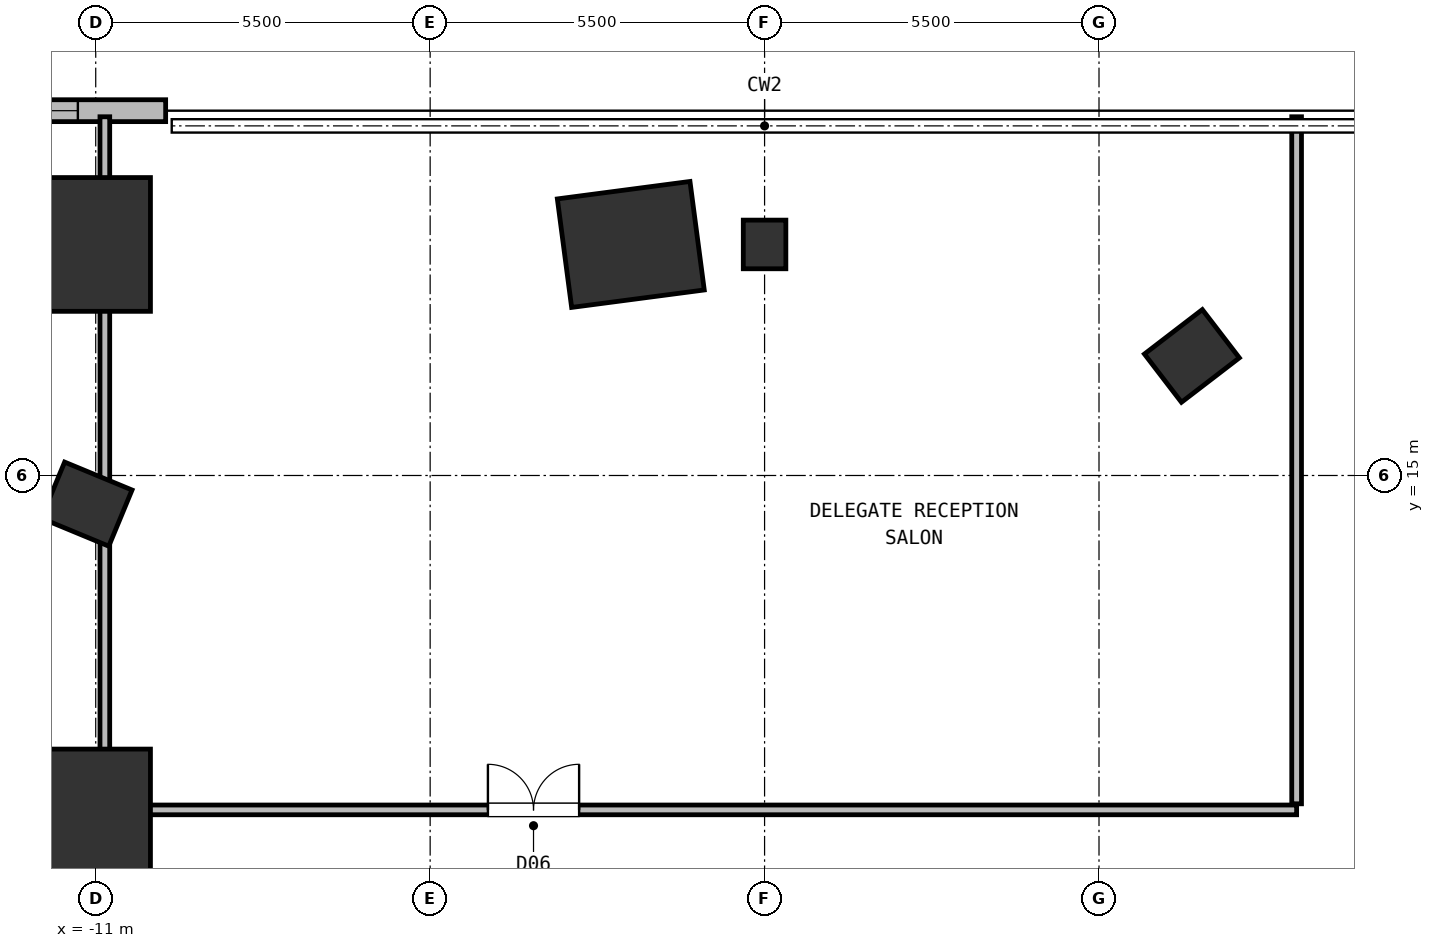
"""IFC4 building model, lengths in metres.
Left out: names, types, materials, properties, quantities, classifications, styles, units other than length and angle.
Written with IfcOpenShell. Run it as: python <this file> out.ifc"""

import sys

from ifc_helpers import new_model, si_unit, direction, frame, frame_2d, origin, origin_2d, place, context, subcontext, project, spatial, rectangle, extrude, element, fill, save


model = new_model("IFC4")
c1 = context("Model", 3, precision=1e-05, world=origin(), true_north=direction((0.0, 1.0)))
c2 = subcontext(c1, "Body", "Model", "MODEL_VIEW")
j1 = project(units=[si_unit("LENGTHUNIT", "METRE"), si_unit("PLANEANGLEUNIT", "RADIAN")], contexts=[c1])
p1 = place(None, origin())
s1 = spatial("IfcSite", under=j1, at=p1, CompositionType="ELEMENT")
p2 = place(p1, origin())
s2 = spatial("IfcBuilding", under=s1, at=p2, CompositionType="ELEMENT")
p3 = place(p2, frame((0.0, 0.0, 21.5)))
s3 = spatial("IfcBuildingStorey", under=s2, at=p3, CompositionType="ELEMENT", Elevation=21.5)
p4 = place(p3, frame((-2.2, 18.8, 0.0), z_axis=(0.0, 0.0, 1.0), x_axis=(-0.13052619222, 0.991444861374, 0.0)))
e1 = element("IfcColumn", 1, at=p4, inside=s3, PredefinedType="COLUMN", context=c2, shape_type="SweptSolid", body=[
    extrude(rectangle(XDim=1.8, YDim=2.2, at=origin_2d()), origin(), (0.0, 0.0, 1.0), 4.5),
])
for number, where, z_axis, x_axis in (
    (2, (-11.148, 14.529, 0.0), (0.0, 0.0, 1.0), (0.383, 0.924, 0.0)),
    (3, (7.028, 16.966, 0.0), (0.0, 0.0, 1.0), (-0.609, 0.793, 0.0)),
):
    element("IfcColumn", number, at=place(p3, frame(where, z_axis=z_axis, x_axis=x_axis)), inside=s3, PredefinedType="COLUMN", context=c2, shape_type="SweptSolid", body=[
        extrude(rectangle(XDim=1.0, YDim=1.2, at=origin_2d()), origin(), (0.0, 0.0, 1.0), 4.5),
    ])
for number, where, z_axis, x_axis in (
    (4, (-11.0, 9.4, 0.0), (0.0, 0.0, 1.0), (1.0, 0.0, 0.0)),
    (5, (-11.0, 18.8, 0.0), (0.0, 0.0, 1.0), (1.0, 0.0, 0.0)),
):
    element("IfcColumn", number, at=place(p3, frame(where, z_axis=z_axis, x_axis=x_axis)), inside=s3, PredefinedType="COLUMN", context=c2, shape_type="SweptSolid", body=[
        extrude(rectangle(XDim=1.8, YDim=2.2, at=origin_2d()), origin(), (0.0, 0.0, 1.0), 4.5),
    ])
p5 = place(p3, frame((0.0, 18.8, 0.0), z_axis=(0.0, 0.0, 1.0), x_axis=(1.0, 0.0, 0.0)))
e6 = element("IfcColumn", 6, at=p5, inside=s3, PredefinedType="COLUMN", context=c2, shape_type="SweptSolid", body=[
    extrude(rectangle(XDim=0.7, YDim=0.8, at=origin_2d()), origin(), (0.0, 0.0, 1.0), 4.5),
])
p6 = place(p3, frame((-31.0, 21.0, 0.0), z_axis=(0.0, 0.0, 1.0), x_axis=(1.0, 0.0, 0.0)))
e7 = element("IfcWall", 7, at=p6, inside=s3, PredefinedType="SOLIDWALL", context=c2, shape_type="SweptSolid", body=[
    extrude(rectangle(XDim=21.15, YDim=0.36, at=frame_2d((10.575, 0.0))), origin(), (0.0, 0.0, 1.0), 4.22),
])
p7 = place(p6, frame((1.444, 0.0, 0.95)))
e8 = element("IfcOpeningElement", 8, at=p7, cuts=e7, PredefinedType="OPENING", context=c2, shape_type="SweptSolid", body=[
    extrude(rectangle(XDim=2.4, YDim=2.6, at=frame_2d((1.2, 1.3))), frame((0.0, 0.19, 0.0), z_axis=(0.0, -1.0, 0.0), x_axis=(1.0, 0.0, 0.0)), (0.0, 0.0, 1.0), 0.38),
])
p8 = place(p6, frame((6.731, 0.0, 0.95)))
e9 = element("IfcOpeningElement", 9, at=p8, cuts=e7, PredefinedType="OPENING", context=c2, shape_type="SweptSolid", body=[
    extrude(rectangle(XDim=2.4, YDim=2.6, at=frame_2d((1.2, 1.3))), frame((0.0, 0.19, 0.0), z_axis=(0.0, -1.0, 0.0), x_axis=(1.0, 0.0, 0.0)), (0.0, 0.0, 1.0), 0.38),
])
p9 = place(p6, frame((12.019, 0.0, 0.95)))
e10 = element("IfcOpeningElement", 10, at=p9, cuts=e7, PredefinedType="OPENING", context=c2, shape_type="SweptSolid", body=[
    extrude(rectangle(XDim=2.4, YDim=2.6, at=frame_2d((1.2, 1.3))), frame((0.0, 0.19, 0.0), z_axis=(0.0, -1.0, 0.0), x_axis=(1.0, 0.0, 0.0)), (0.0, 0.0, 1.0), 0.38),
])
p10 = place(p6, frame((17.306, 0.0, 0.95)))
e11 = element("IfcOpeningElement", 11, at=p10, cuts=e7, PredefinedType="OPENING", context=c2, shape_type="SweptSolid", body=[
    extrude(rectangle(XDim=2.4, YDim=2.6, at=frame_2d((1.2, 1.3))), frame((0.0, 0.19, 0.0), z_axis=(0.0, -1.0, 0.0), x_axis=(1.0, 0.0, 0.0)), (0.0, 0.0, 1.0), 0.38),
])
p11 = place(p3, frame((-10.85, 2.0, 0.0), z_axis=(0.0, 0.0, 1.0), x_axis=(0.0, 1.0, 0.0)))
e12 = element("IfcWall", 12, at=p11, inside=s3, PredefinedType="PARTITIONING", context=c2, shape_type="SweptSolid", body=[
    extrude(rectangle(XDim=18.9, YDim=0.16, at=frame_2d((9.45, 0.0))), origin(), (0.0, 0.0, 1.0), 3.6),
])
p12 = place(p11, frame((4.06, 0.0, 0.0)))
e13 = element("IfcOpeningElement", 13, at=p12, cuts=e12, PredefinedType="OPENING", context=c2, shape_type="SweptSolid", body=[
    extrude(rectangle(XDim=1.5, YDim=2.2, at=frame_2d((0.75, 1.1))), frame((0.0, 0.09, 0.0), z_axis=(0.0, -1.0, 0.0), x_axis=(1.0, 0.0, 0.0)), (0.0, 0.0, 1.0), 0.18),
])
p13 = place(p3, frame((-10.75, 9.5, 0.0), z_axis=(0.0, 0.0, 1.0), x_axis=(1.0, 0.0, 0.0)))
e14 = element("IfcWall", 14, at=p13, inside=s3, PredefinedType="PARTITIONING", context=c2, shape_type="SweptSolid", body=[
    extrude(rectangle(XDim=19.5, YDim=0.16, at=frame_2d((9.75, 0.0))), origin(), (0.0, 0.0, 1.0), 3.3),
])
p14 = place(p13, frame((6.2, 0.0, 0.0)))
e15 = element("IfcOpeningElement", 15, at=p14, cuts=e14, PredefinedType="OPENING", context=c2, shape_type="SweptSolid", body=[
    extrude(rectangle(XDim=1.5, YDim=2.2, at=frame_2d((0.75, 1.1))), frame((0.0, 0.09, 0.0), z_axis=(0.0, -1.0, 0.0), x_axis=(1.0, 0.0, 0.0)), (0.0, 0.0, 1.0), 0.18),
])
p15 = place(p3, frame((8.75, 9.6, 0.0), z_axis=(0.0, 0.0, 1.0), x_axis=(0.0, 1.0, 0.0)))
e16 = element("IfcWall", 16, at=p15, inside=s3, PredefinedType="PARTITIONING", context=c2, shape_type="SweptSolid", body=[
    extrude(rectangle(XDim=11.3, YDim=0.16, at=frame_2d((5.65, 0.0))), origin(), (0.0, 0.0, 1.0), 4.22),
])
p16 = place(p10, origin())
e17 = element("IfcWindow", 17, at=p16, inside=s3, PartitioningType="SINGLE_PANEL", PredefinedType="WINDOW", context=c2, shape_type="SweptSolid", body=[
    extrude(rectangle(XDim=2.4, YDim=2.6, at=frame_2d((1.2, 1.3))), frame((0.0, 0.03, 0.0), z_axis=(0.0, -1.0, 0.0), x_axis=(1.0, 0.0, 0.0)), (0.0, 0.0, 1.0), 0.06),
])
fill(e11, e17)
p17 = place(p14, origin())
e18 = element("IfcDoor", 18, at=p17, inside=s3, OperationType="DOUBLE_DOOR_SINGLE_SWING", PredefinedType="DOOR", context=c2, shape_type="SweptSolid", body=[
    extrude(rectangle(XDim=1.5, YDim=2.2, at=frame_2d((0.75, 1.1))), frame((0.0, 0.025, 0.0), z_axis=(0.0, -1.0, 0.0), x_axis=(1.0, 0.0, 0.0)), (0.0, 0.0, 1.0), 0.05),
])
fill(e15, e18)
save(model, sys.argv[1])
